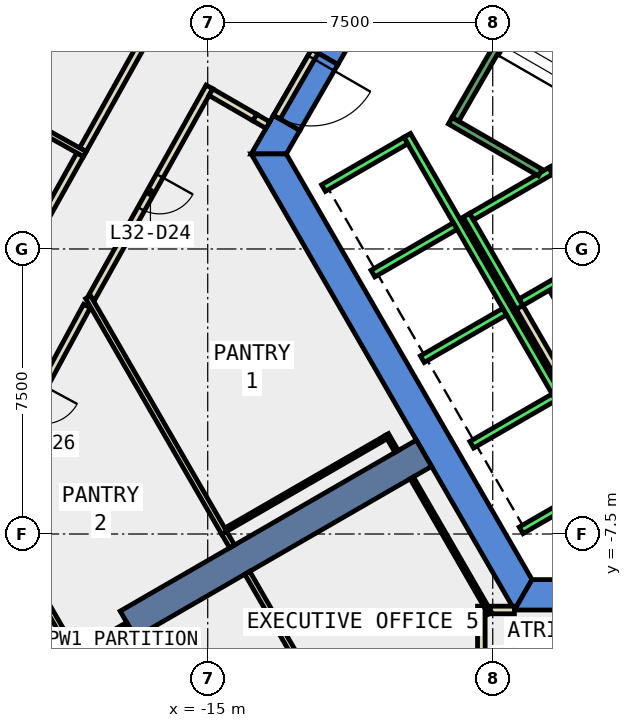
"""IFC4 building model, lengths in metres.
Left out: names, types, materials, properties, quantities, classifications, styles, units other than length and angle.
Written with IfcOpenShell. Run it as: python <this file> out.ifc"""

import sys

from ifc_helpers import new_model, si_unit, direction, frame, frame_2d, origin, place, context, subcontext, project, spatial, polyline, rectangle, outline, extrude, element, fill, save


model = new_model("IFC4")
c1 = context("Model", 3, precision=1e-05, world=origin(), true_north=direction((0.0, 1.0)))
c2 = subcontext(c1, "Body", "Model", "MODEL_VIEW")
j1 = project(units=[si_unit("LENGTHUNIT", "METRE"), si_unit("PLANEANGLEUNIT", "RADIAN")], contexts=[c1])
p1 = place(None, origin())
s1 = spatial("IfcSite", under=j1, at=p1, CompositionType="ELEMENT")
p2 = place(p1, origin())
s2 = spatial("IfcBuilding", under=s1, at=p2, CompositionType="ELEMENT")
p3 = place(p2, frame((0.0, 0.0, 146.6)))
s3 = spatial("IfcBuildingStorey", under=s2, at=p3, CompositionType="ELEMENT", Elevation=146.6)
p4 = place(p3, frame((0.0, 0.0, -0.4)))
e1 = element("IfcWall", 1, at=p4, inside=s3, PredefinedType="SHEAR", context=c2, shape_type="SweptSolid", body=[
    extrude(outline(polyline([(-12.267, 5.252), (-11.575, 4.852), (-6.466, 13.7), (-6.928, 14.5), (-12.267, 5.252)])), origin(), (0.0, 0.0, 1.0), 4.2),
])
p5 = place(p3, frame((0.0, 0.0, -0.4)))
e2 = element("IfcWall", 2, at=p5, inside=s3, PredefinedType="SHEAR", context=c2, shape_type="SweptSolid", body=[
    extrude(outline(polyline([(-12.575, 3.12), (-13.267, 3.52), (-13.856, 2.5), (-12.933, 2.5), (-12.575, 3.12)])), origin(), (0.0, 0.0, 1.0), 4.2),
])
p6 = place(p3, frame((0.0, 0.0, 3.6)))
e3 = element("IfcWall", 3, at=p6, inside=s3, PredefinedType="SHEAR", context=c2, shape_type="SweptSolid", body=[
    extrude(outline(polyline([(-13.267, 3.52), (-12.575, 3.12), (-11.575, 4.852), (-12.267, 5.252), (-13.267, 3.52)])), origin(), (0.0, 0.0, 1.0), 0.2),
])
p7 = place(p3, frame((0.0, 0.0, -0.4)))
e4 = element("IfcWall", 4, at=p7, inside=s3, PredefinedType="SHEAR", context=c2, shape_type="SweptSolid", body=[
    extrude(outline(polyline([(-13.856, 2.5), (-6.928, -9.5), (-6.466, -8.7), (-12.933, 2.5), (-13.856, 2.5)])), origin(), (0.0, 0.0, 1.0), 4.2),
])
p8 = place(p3, frame((0.0, 0.0, -0.4)))
e5 = element("IfcWall", 5, at=p8, inside=s3, PredefinedType="SHEAR", context=c2, shape_type="SweptSolid", body=[
    extrude(outline(polyline([(3.75, -9.5), (3.75, -8.7), (-6.466, -8.7), (-6.928, -9.5), (3.75, -9.5)])), origin(), (0.0, 0.0, 1.0), 4.2),
])
p9 = place(p3, frame((-9.31, -5.375, -0.4), z_axis=(0.0, 0.0, 1.0), x_axis=(-0.866017533419, -0.500013631625, 0.0)))
e6 = element("IfcWall", 6, at=p9, inside=s3, PredefinedType="SHEAR", context=c2, shape_type="SweptSolid", body=[
    extrude(rectangle(XDim=9.0, YDim=0.8, at=frame_2d((4.5, 0.0))), origin(), (0.0, 0.0, 1.0), 4.2),
])
p10 = place(p3, frame((-13.417, 3.26, 0.0), z_axis=(0.0, 0.0, 1.0), x_axis=(-0.866398669086, 0.499352927503, 0.0)))
e7 = element("IfcWall", 7, at=p10, inside=s3, PredefinedType="PARTITIONING", context=c2, shape_type="SweptSolid", body=[
    extrude(rectangle(XDim=0.4, YDim=0.2, at=frame_2d((0.2, 0.0))), origin(), (0.0, 0.0, 1.0), 2.4),
])
p11 = place(p3, frame((-14.955, 4.264, 0.0), z_axis=(0.0, 0.0, 1.0), x_axis=(-0.4879770011, -0.872856486713, 0.0)))
e8 = element("IfcWall", 8, at=p11, inside=s3, PredefinedType="PARTITIONING", context=c2, shape_type="SweptSolid", body=[
    extrude(rectangle(XDim=6.363, YDim=0.2, at=frame_2d((3.182, 0.0))), origin(), (0.0, 0.0, 1.0), 3.8),
])
p12 = place(p11, frame((2.681, 0.0, 0.0)))
e9 = element("IfcOpeningElement", 9, at=p12, cuts=e8, PredefinedType="OPENING", context=c2, shape_type="SweptSolid", body=[
    extrude(rectangle(XDim=1.0, YDim=2.1, at=frame_2d((0.5, 1.05))), frame((0.0, 0.11, 0.0), z_axis=(0.0, -1.0, 0.0), x_axis=(1.0, 0.0, 0.0)), (0.0, 0.0, 1.0), 0.22),
])
p13 = place(p3, frame((-18.178, -1.501, 0.0), z_axis=(0.0, 0.0, 1.0), x_axis=(-0.475923642768, -0.879486603795, 0.0)))
e10 = element("IfcWall", 10, at=p13, inside=s3, PredefinedType="PARTITIONING", context=c2, shape_type="SweptSolid", body=[
    extrude(rectangle(XDim=5.776, YDim=0.2, at=frame_2d((2.888, 0.0))), origin(), (0.0, 0.0, 1.0), 3.8),
])
p14 = place(p13, frame((2.388, 0.0, 0.0)))
e11 = element("IfcOpeningElement", 11, at=p14, cuts=e10, PredefinedType="OPENING", context=c2, shape_type="SweptSolid", body=[
    extrude(rectangle(XDim=1.0, YDim=2.1, at=frame_2d((0.5, 1.05))), frame((0.0, 0.11, 0.0), z_axis=(0.0, -1.0, 0.0), x_axis=(1.0, 0.0, 0.0)), (0.0, 0.0, 1.0), 0.22),
])
p15 = place(p3, frame((-18.284, 2.612, 0.0), z_axis=(0.0, 0.0, 1.0), x_axis=(0.487871212611, 0.872915620152, 0.0)))
e12 = element("IfcWall", 12, at=p15, inside=s3, PredefinedType="PARTITIONING", context=c2, shape_type="SweptSolid", body=[
    extrude(rectangle(XDim=3.402, YDim=0.2, at=frame_2d((1.701, 0.0))), origin(), (0.0, 0.0, 1.0), 3.8),
])
p16 = place(p3, frame((-20.018, -0.489, 0.0), z_axis=(0.0, 0.0, 1.0), x_axis=(0.48792588674, 0.872885060617, 0.0)))
e13 = element("IfcWall", 13, at=p16, inside=s3, PredefinedType="PARTITIONING", context=c2, shape_type="SweptSolid", body=[
    extrude(rectangle(XDim=3.403, YDim=0.2, at=frame_2d((1.701, 0.0))), origin(), (0.0, 0.0, 1.0), 3.8),
])
p17 = place(p3, frame((-5.126, -2.422, 0.0), z_axis=(0.0, 0.0, 1.0), x_axis=(-0.500062241894, 0.865989465428, 0.0)))
e14 = element("IfcWall", 14, at=p17, inside=s3, PredefinedType="PARTITIONING", context=c2, shape_type="SweptSolid", body=[
    extrude(rectangle(XDim=1.7, YDim=0.2, at=frame_2d((0.85, 0.0))), origin(), (0.0, 0.0, 1.0), 3.8),
])
p18 = place(p3, frame((-5.492, -3.788, 0.0), z_axis=(0.0, 0.0, 1.0), x_axis=(-0.500008949224, 0.866020236886, 0.0)))
e15 = element("IfcWall", 15, at=p18, inside=s3, PredefinedType="PARTITIONING", context=c2, shape_type="SweptSolid", body=[
    extrude(rectangle(XDim=2.68, YDim=0.2, at=frame_2d((1.34, 0.0))), origin(), (0.0, 0.0, 1.0), 3.8),
])
p19 = place(p3, frame((-7.572, -9.499, 0.0), z_axis=(0.0, 0.0, 1.0), x_axis=(1.0, 0.0, 0.0)))
e16 = element("IfcWall", 16, at=p19, inside=s3, PredefinedType="PARTITIONING", context=c2, shape_type="SweptSolid", body=[
    extrude(rectangle(XDim=0.643, YDim=0.2, at=frame_2d((0.322, 0.0))), origin(), (0.0, 0.0, 1.0), 3.8),
])
p20 = place(p3, frame((-7.8, -15.139, 0.0), z_axis=(0.0, 0.0, 1.0), x_axis=(0.0, 1.0, 0.0)))
e17 = element("IfcWall", 17, at=p20, inside=s3, PredefinedType="PARTITIONING", context=c2, shape_type="SweptSolid", body=[
    extrude(rectangle(XDim=5.74, YDim=0.2, at=frame_2d((2.87, 0.0))), origin(), (0.0, 0.0, 1.0), 3.8),
])
p21 = place(p20, frame((2.37, 0.0, 0.0)))
e18 = element("IfcOpeningElement", 18, at=p21, cuts=e17, PredefinedType="OPENING", context=c2, shape_type="SweptSolid", body=[
    extrude(rectangle(XDim=1.0, YDim=2.1, at=frame_2d((0.5, 1.05))), frame((0.0, 0.11, 0.0), z_axis=(0.0, -1.0, 0.0), x_axis=(1.0, 0.0, 0.0)), (0.0, 0.0, 1.0), 0.22),
])
p22 = place(p3, frame((-7.572, -9.586, 0.0), z_axis=(0.0, 0.0, 1.0), x_axis=(-0.500037407586, 0.866003805427, 0.0)))
e19 = element("IfcWall", 19, at=p22, inside=s3, PredefinedType="PARTITIONING", context=c2, shape_type="SweptSolid", body=[
    extrude(rectangle(XDim=4.115, YDim=0.1, at=frame_2d((2.058, 0.0))), origin(), (0.0, 0.0, 1.0), 3.8),
])
p23 = place(p3, frame((-10.305, -4.951, 0.0), z_axis=(0.0, 0.0, 1.0), x_axis=(-0.866031185235, -0.4999899861, 0.0)))
e20 = element("IfcWall", 20, at=p23, inside=s3, PredefinedType="PARTITIONING", context=c2, shape_type="SweptSolid", body=[
    extrude(rectangle(XDim=4.95, YDim=0.1, at=frame_2d((2.475, 0.0))), origin(), (0.0, 0.0, 1.0), 3.8),
])
p24 = place(p3, frame((-14.567, -7.469, 0.0), z_axis=(0.0, 0.0, 1.0), x_axis=(-0.500056007527, 0.865993065409, 0.0)))
e21 = element("IfcWall", 21, at=p24, inside=s3, PredefinedType="PARTITIONING", context=c2, shape_type="SweptSolid", body=[
    extrude(rectangle(XDim=7.159, YDim=0.15, at=frame_2d((3.58, 0.0))), origin(), (0.0, 0.0, 1.0), 3.8),
])
p25 = place(p3, frame((-14.359, -7.828, 0.0), z_axis=(0.0, 0.0, 1.0), x_axis=(-0.501453821755, 0.865184410775, 0.0)))
e22 = element("IfcWall", 22, at=p25, inside=s3, PredefinedType="PARTITIONING", context=c2, shape_type="SweptSolid", body=[
    extrude(rectangle(XDim=0.415, YDim=0.15, at=frame_2d((0.208, 0.0))), origin(), (0.0, 0.0, 1.0), 3.8),
])
p26 = place(p3, frame((-10.18, -15.068, 0.0), z_axis=(0.0, 0.0, 1.0), x_axis=(-0.499907901386, 0.866078570415, 0.0)))
e23 = element("IfcWall", 23, at=p26, inside=s3, PredefinedType="PARTITIONING", context=c2, shape_type="SweptSolid", body=[
    extrude(rectangle(XDim=7.56, YDim=0.15, at=frame_2d((3.78, 0.0))), origin(), (0.0, 0.0, 1.0), 3.8),
])
p27 = place(p3, frame((-17.108, -9.869, 0.0), z_axis=(0.0, 0.0, 1.0), x_axis=(-0.866054481515, -0.499949632511, 0.0)))
e24 = element("IfcWall", 24, at=p27, inside=s3, PredefinedType="PARTITIONING", context=c2, shape_type="SweptSolid", body=[
    extrude(rectangle(XDim=1.675, YDim=0.1, at=frame_2d((0.837, 0.0))), origin(), (0.0, 0.0, 1.0), 3.8),
])
p28 = place(p3, frame((-18.518, -10.625, 0.0), z_axis=(0.0, 0.0, 1.0), x_axis=(-0.50001189137, 0.86601853819, 0.0)))
e25 = element("IfcWall", 25, at=p28, inside=s3, PredefinedType="PARTITIONING", context=c2, shape_type="SweptSolid", body=[
    extrude(rectangle(XDim=4.746, YDim=0.15, at=frame_2d((2.373, 0.0))), origin(), (0.0, 0.0, 1.0), 3.8),
])
p29 = place(p3, frame((-18.234, 2.497, 0.0), z_axis=(0.0, 0.0, 1.0), x_axis=(-0.872820235044, 0.4880418397, 0.0)))
e26 = element("IfcWall", 26, at=p29, inside=s3, PredefinedType="PARTITIONING", context=c2, shape_type="SweptSolid", body=[
    extrude(rectangle(XDim=6.7, YDim=0.15, at=frame_2d((3.35, 0.0))), origin(), (0.0, 0.0, 1.0), 3.8),
])
p30 = place(p3, frame((-12.18, 5.202, 0.0), z_axis=(0.0, 0.0, 1.0), x_axis=(-0.50002537861, -0.866010750942, 0.0)))
e27 = element("IfcWall", 27, at=p30, inside=s3, PredefinedType="PARTITIONING", context=c2, shape_type="SweptSolid", body=[
    extrude(rectangle(XDim=2.0, YDim=0.2, at=frame_2d((1.0, 0.0))), origin(), (0.0, 0.0, 1.0), 2.4),
])
p31 = place(p30, frame((0.19, 0.0, 0.0)))
e28 = element("IfcOpeningElement", 28, at=p31, cuts=e27, PredefinedType="OPENING", context=c2, shape_type="SweptSolid", body=[
    extrude(rectangle(XDim=1.8, YDim=2.1, at=frame_2d((0.9, 1.05))), frame((0.0, 0.11, 0.0), z_axis=(0.0, -1.0, 0.0), x_axis=(1.0, 0.0, 0.0)), (0.0, 0.0, 1.0), 0.22),
])
p32 = place(p3, frame((-10.03, -5.329, 0.0), z_axis=(0.0, 0.0, 1.0), x_axis=(-0.499352927503, 0.866398669086, 0.0)))
e29 = element("IfcWall", 29, at=p32, inside=s3, PredefinedType="PARTITIONING", context=c2, shape_type="SweptSolid", body=[
    extrude(rectangle(XDim=0.515, YDim=0.1, at=frame_2d((0.257, 0.0))), origin(), (0.0, 0.0, 1.0), 3.8),
])
p33 = place(p3, frame((-13.764, 3.46, 0.0), z_axis=(0.0, 0.0, 1.0), x_axis=(-0.865932130826, 0.500161518715, 0.0)))
e30 = element("IfcWall", 30, at=p33, inside=s3, PredefinedType="PARTITIONING", context=c2, shape_type="SweptSolid", body=[
    extrude(rectangle(XDim=1.332, YDim=0.2, at=frame_2d((0.666, 0.0))), origin(), (0.0, 0.0, 1.0), 3.8),
])
p34 = place(p3, frame((-5.94, 2.188, 0.0), z_axis=(0.0, 0.0, 1.0), x_axis=(0.49994636267, -0.866056369097, 0.0)))
e31 = element("IfcWall", 31, at=p34, inside=s3, PredefinedType="STANDARD", context=c2, shape_type="SweptSolid", body=[
    extrude(rectangle(XDim=2.8, YDim=0.2, at=frame_2d((1.4, 0.0))), origin(), (0.0, 0.0, 1.0), 3.8),
])
p35 = place(p34, frame((1.225, 0.0, 0.0)))
e32 = element("IfcOpeningElement", 32, at=p35, cuts=e31, PredefinedType="OPENING", context=c2, shape_type="SweptSolid", body=[
    extrude(rectangle(XDim=1.1, YDim=2.1, at=frame_2d((0.55, 1.05))), frame((0.0, 0.11, 0.0), z_axis=(0.0, -1.0, 0.0), x_axis=(1.0, 0.0, 0.0)), (0.0, 0.0, 1.0), 0.22),
])
p36 = place(p3, frame((-8.192, 0.888, 0.0), z_axis=(0.0, 0.0, 1.0), x_axis=(0.49994636267, -0.866056369097, 0.0)))
e33 = element("IfcWall", 33, at=p36, inside=s3, PredefinedType="STANDARD", context=c2, shape_type="SweptSolid", body=[
    extrude(rectangle(XDim=2.8, YDim=0.2, at=frame_2d((1.4, 0.0))), origin(), (0.0, 0.0, 1.0), 3.8),
])
for number, where, z_axis, x_axis in (
    (34, (-5.977, 2.052, 0.0), (0.0, 0.0, 1.0), (-0.866, -0.5, 0.0)),
    (35, (-4.677, -0.2, 0.0), (0.0, 0.0, 1.0), (-0.866, -0.5, 0.0)),
):
    element("IfcWall", number, at=place(p3, frame(where, z_axis=z_axis, x_axis=x_axis)), inside=s3, PredefinedType="STANDARD", context=c2, shape_type="SweptSolid", body=[
        extrude(rectangle(XDim=2.399, YDim=0.2, at=frame_2d((1.2, 0.0))), origin(), (0.0, 0.0, 1.0), 3.8),
    ])
p37 = place(p3, frame((-9.751, 2.99, 0.0), z_axis=(0.0, 0.0, 1.0), x_axis=(0.50000090737, -0.866024879913, 0.0)))
e36 = element("IfcWall", 36, at=p37, inside=s3, PredefinedType="STANDARD", context=c2, shape_type="SweptSolid", body=[
    extrude(rectangle(XDim=10.6, YDim=0.2, at=frame_2d((5.3, 0.0))), origin(), (0.0, 0.0, 1.0), 3.8),
])
p38 = place(p3, frame((-9.788, 2.853, 0.0), z_axis=(0.0, 0.0, 1.0), x_axis=(-0.865998541277, -0.500046524342, 0.0)))
e37 = element("IfcWall", 37, at=p38, inside=s3, PredefinedType="STANDARD", context=c2, shape_type="SweptSolid", body=[
    extrude(rectangle(XDim=2.5, YDim=0.2, at=frame_2d((1.25, 0.0))), origin(), (0.0, 0.0, 1.0), 3.8),
])
for number, where, z_axis, x_axis in (
    (38, (-8.488, 0.602, 0.0), (0.0, 0.0, 1.0), (-0.866, -0.5, 0.0)),
    (39, (-7.188, -1.65, 0.0), (0.0, 0.0, 1.0), (-0.866, -0.5, 0.0)),
    (40, (-5.888, -3.902, 0.0), (0.0, 0.0, 1.0), (-0.866, -0.5, 0.0)),
    (41, (-4.588, -6.153, 0.0), (0.0, 0.0, 1.0), (-0.866, -0.5, 0.0)),
):
    element("IfcWall", number, at=place(p3, frame(where, z_axis=z_axis, x_axis=x_axis)), inside=s3, PredefinedType="STANDARD", context=c2, shape_type="SweptSolid", body=[
        extrude(rectangle(XDim=2.5, YDim=0.2, at=frame_2d((1.25, 0.0))), origin(), (0.0, 0.0, 1.0), 3.8),
    ])
p39 = place(p3, frame((-6.25, 2.01, 0.0), z_axis=(0.0, 0.0, 1.0), x_axis=(-0.86611865017, 0.499838457731, 0.0)))
e42 = element("IfcWall", 42, at=p39, inside=s3, PredefinedType="STANDARD", context=c2, shape_type="SweptSolid", body=[
    extrude(rectangle(XDim=2.733, YDim=0.2, at=frame_2d((1.366, 0.0))), origin(), (0.0, 0.0, 1.0), 3.8),
])
p40 = place(p3, frame((-5.03, 9.388, 0.0), z_axis=(0.0, 0.0, 1.0), x_axis=(-0.499978703459, -0.866037698999, 0.0)))
e43 = element("IfcWall", 43, at=p40, inside=s3, PredefinedType="STANDARD", context=c2, shape_type="SweptSolid", body=[
    extrude(rectangle(XDim=6.9, YDim=0.2, at=frame_2d((3.45, 0.0))), origin(), (0.0, 0.0, 1.0), 3.8),
])
p41 = place(p12, origin())
e44 = element("IfcDoor", 44, at=p41, inside=s3, OperationType="SINGLE_SWING_LEFT", PredefinedType="DOOR", context=c2, shape_type="SweptSolid", body=[
    extrude(rectangle(XDim=1.0, YDim=2.1, at=frame_2d((0.5, 1.05))), frame((0.0, 0.025, 0.0), z_axis=(0.0, -1.0, 0.0), x_axis=(1.0, 0.0, 0.0)), (0.0, 0.0, 1.0), 0.05),
])
fill(e9, e44)
p42 = place(p31, origin())
e45 = element("IfcDoor", 45, at=p42, inside=s3, OperationType="DOUBLE_DOOR_SINGLE_SWING", PredefinedType="DOOR", context=c2, shape_type="SweptSolid", body=[
    extrude(rectangle(XDim=1.8, YDim=2.1, at=frame_2d((0.9, 1.05))), frame((0.0, 0.025, 0.0), z_axis=(0.0, -1.0, 0.0), x_axis=(1.0, 0.0, 0.0)), (0.0, 0.0, 1.0), 0.05),
])
fill(e28, e45)
save(model, sys.argv[1])
